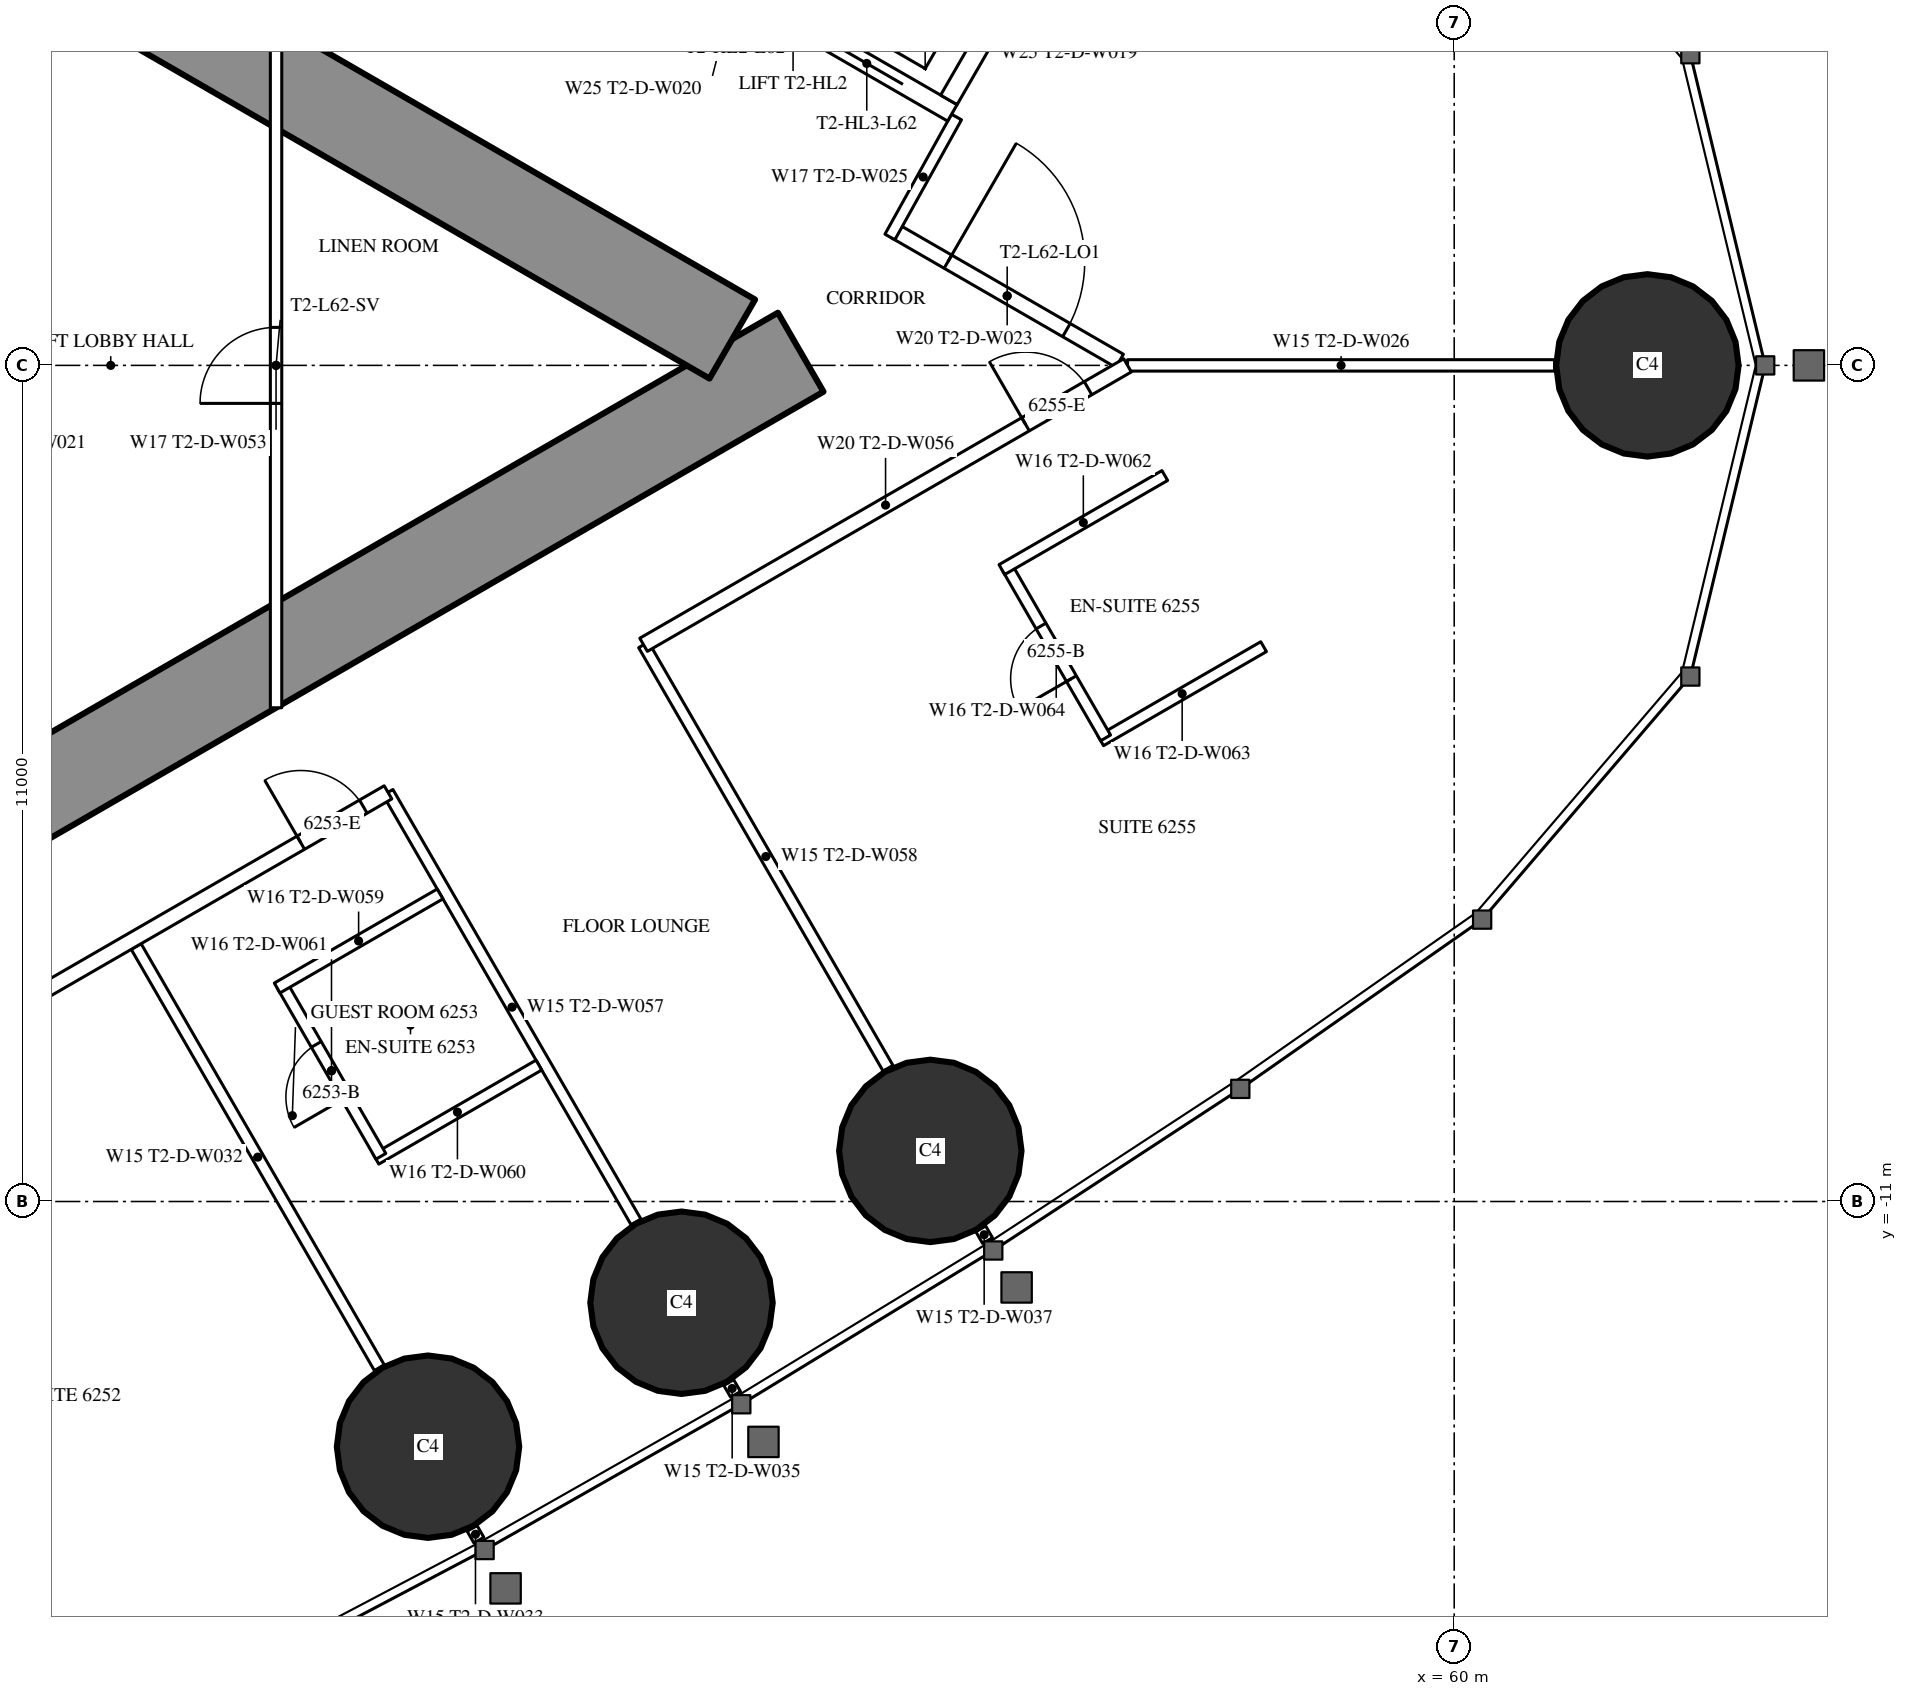
"""IFC4 building model, lengths in metres.
Left out: names, types, materials, properties, quantities, classifications, styles, units other than length and angle.
Written with IfcOpenShell. Run it as: python <this file> out.ifc"""

import sys

from ifc_helpers import new_model, si_unit, direction, frame, frame_2d, origin, origin_2d, place, context, subcontext, project, spatial, rectangle, circle, extrude, element, fill, save


model = new_model("IFC4")
c1 = context("Model", 3, precision=1e-05, world=origin(), true_north=direction((0.0, 1.0)))
c2 = subcontext(c1, "Body", "Model", "MODEL_VIEW")
j1 = project(units=[si_unit("LENGTHUNIT", "METRE"), si_unit("PLANEANGLEUNIT", "RADIAN")], contexts=[c1])
p1 = place(None, origin())
s1 = spatial("IfcSite", under=j1, at=p1, CompositionType="ELEMENT")
p2 = place(p1, origin())
s2 = spatial("IfcBuilding", under=s1, at=p2, CompositionType="ELEMENT")
p3 = place(p2, frame((0.0, 0.0, 233.3)))
s3 = spatial("IfcBuildingStorey", under=s2, at=p3, CompositionType="ELEMENT", Elevation=233.3)
for number, where, z_axis, x_axis in (
    (1, (62.542, 0.0, 0.0), (0.0, 0.0, 1.0), (1.0, 0.0, 0.0)),
    (2, (46.499, -14.226, 0.0), (0.0, 0.0, 1.0), (1.0, 0.0, 0.0)),
    (3, (49.834, -12.332, 0.0), (0.0, 0.0, 1.0), (1.0, 0.0, 0.0)),
    (4, (53.108, -10.334, 0.0), (0.0, 0.0, 1.0), (1.0, 0.0, 0.0)),
):
    element("IfcColumn", number, at=place(p3, frame(where, z_axis=z_axis, x_axis=x_axis)), inside=s3, PredefinedType="COLUMN", context=c2, shape_type="SweptSolid", body=[
        extrude(circle(Radius=1.2, at=origin_2d()), origin(), (0.0, 0.0, 1.0), 3.6),
    ])
p4 = place(p3, frame((27.2, -13.8, 0.0), z_axis=(0.0, 0.0, 1.0), x_axis=(0.866027159892, 0.499996958321, 0.0)))
e5 = element("IfcWall", 5, at=p4, inside=s3, PredefinedType="SHEAR", context=c2, shape_type="SweptSolid", body=[
    extrude(rectangle(XDim=27.947, YDim=1.2, at=frame_2d((13.973, 0.0))), origin(), (0.0, 0.0, 1.0), 3.6),
])
p5 = place(p4, frame((4.6, 0.0, 0.0)))
e6 = element("IfcOpeningElement", 6, at=p5, cuts=e5, PredefinedType="OPENING", context=c2, shape_type="SweptSolid", body=[
    extrude(rectangle(XDim=1.0, YDim=2.2, at=frame_2d((0.5, 1.1))), frame((0.0, 0.61, 0.0), z_axis=(0.0, -1.0, 0.0), x_axis=(1.0, 0.0, 0.0)), (0.0, 0.0, 1.0), 1.22),
])
p6 = place(p4, frame((13.395, 0.0, 0.0)))
e7 = element("IfcOpeningElement", 7, at=p6, cuts=e5, PredefinedType="OPENING", context=c2, shape_type="SweptSolid", body=[
    extrude(rectangle(XDim=1.8, YDim=2.2, at=frame_2d((0.9, 1.1))), frame((0.0, 0.61, 0.0), z_axis=(0.0, -1.0, 0.0), x_axis=(1.0, 0.0, 0.0)), (0.0, 0.0, 1.0), 1.22),
])
p7 = place(p3, frame((27.2, 13.8, 0.0), z_axis=(0.0, 0.0, 1.0), x_axis=(0.866024515034, -0.500001539357, 0.0)))
e8 = element("IfcWall", 8, at=p7, inside=s3, PredefinedType="SHEAR", context=c2, shape_type="SweptSolid", body=[
    extrude(rectangle(XDim=26.907, YDim=1.2, at=frame_2d((13.454, 0.0))), origin(), (0.0, 0.0, 1.0), 3.6),
])
p8 = place(p7, frame((4.6, 0.0, 0.0)))
e9 = element("IfcOpeningElement", 9, at=p8, cuts=e8, PredefinedType="OPENING", context=c2, shape_type="SweptSolid", body=[
    extrude(rectangle(XDim=1.0, YDim=2.2, at=frame_2d((0.5, 1.1))), frame((0.0, 0.61, 0.0), z_axis=(0.0, -1.0, 0.0), x_axis=(1.0, 0.0, 0.0)), (0.0, 0.0, 1.0), 1.22),
])
p9 = place(p7, frame((13.395, 0.0, 0.0)))
e10 = element("IfcOpeningElement", 10, at=p9, cuts=e8, PredefinedType="OPENING", context=c2, shape_type="SweptSolid", body=[
    extrude(rectangle(XDim=1.8, YDim=2.2, at=frame_2d((0.9, 1.1))), frame((0.0, 0.61, 0.0), z_axis=(0.0, -1.0, 0.0), x_axis=(1.0, 0.0, 0.0)), (0.0, 0.0, 1.0), 1.22),
])
p10 = place(p3, frame((42.66, -7.646, 0.0), z_axis=(0.0, 0.0, 1.0), x_axis=(0.499996592859, -0.866027370889, 0.0)))
e11 = element("IfcWall", 11, at=p10, inside=s3, PredefinedType="PARTITIONING", context=c2, shape_type="SweptSolid", body=[
    extrude(rectangle(XDim=6.398, YDim=0.15, at=frame_2d((3.199, 0.0))), origin(), (0.0, 0.0, 1.0), 2.45),
])
p11 = place(p3, frame((47.079, -15.3, 0.0), z_axis=(0.0, 0.0, 1.0), x_axis=(0.499212083968, -0.866479829667, 0.0)))
e12 = element("IfcWall", 12, at=p11, inside=s3, PredefinedType="PARTITIONING", context=c2, shape_type="SweptSolid", body=[
    extrude(rectangle(XDim=0.179, YDim=0.15, at=frame_2d((0.09, 0.0))), origin(), (0.0, 0.0, 1.0), 2.45),
])
p12 = place(p3, frame((45.973, -5.617, 0.0), z_axis=(0.0, 0.0, 1.0), x_axis=(0.499985856986, -0.866033569104, 0.0)))
e13 = element("IfcWall", 13, at=p12, inside=s3, PredefinedType="PARTITIONING", context=c2, shape_type="SweptSolid", body=[
    extrude(rectangle(XDim=6.526, YDim=0.15, at=frame_2d((3.263, 0.0))), origin(), (0.0, 0.0, 1.0), 2.45),
])
p13 = place(p3, frame((50.456, -13.382, 0.0), z_axis=(0.0, 0.0, 1.0), x_axis=(0.500661834965, -0.865642955848, 0.0)))
e14 = element("IfcWall", 14, at=p13, inside=s3, PredefinedType="PARTITIONING", context=c2, shape_type="SweptSolid", body=[
    extrude(rectangle(XDim=0.18, YDim=0.15, at=frame_2d((0.09, 0.0))), origin(), (0.0, 0.0, 1.0), 2.45),
])
p14 = place(p3, frame((49.335, -3.676, 0.0), z_axis=(0.0, 0.0, 1.0), x_axis=(0.500000613642, -0.866025049498, 0.0)))
e15 = element("IfcWall", 15, at=p14, inside=s3, PredefinedType="PARTITIONING", context=c2, shape_type="SweptSolid", body=[
    extrude(rectangle(XDim=6.433, YDim=0.15, at=frame_2d((3.216, 0.0))), origin(), (0.0, 0.0, 1.0), 2.45),
])
p15 = place(p3, frame((53.771, -11.36, 0.0), z_axis=(0.0, 0.0, 1.0), x_axis=(0.499524978789, -0.866299483762, 0.0)))
e16 = element("IfcWall", 16, at=p15, inside=s3, PredefinedType="PARTITIONING", context=c2, shape_type="SweptSolid", body=[
    extrude(rectangle(XDim=0.178, YDim=0.15, at=frame_2d((0.089, 0.0))), origin(), (0.0, 0.0, 1.0), 2.45),
])
p16 = place(p3, frame((55.702, 0.0, 0.0), z_axis=(0.0, 0.0, 1.0), x_axis=(1.0, 0.0, 0.0)))
e17 = element("IfcWall", 17, at=p16, inside=s3, PredefinedType="PARTITIONING", context=c2, shape_type="SweptSolid", body=[
    extrude(rectangle(XDim=5.619, YDim=0.15, at=frame_2d((2.81, 0.0))), origin(), (0.0, 0.0, 1.0), 2.45),
])
p17 = place(p3, frame((52.639, 1.769, 0.0), z_axis=(0.0, 0.0, 1.0), x_axis=(0.866027340901, -0.4999966448, 0.0)))
e18 = element("IfcWall", 18, at=p17, inside=s3, PredefinedType="PARTITIONING", context=c2, shape_type="SweptSolid", body=[
    extrude(rectangle(XDim=3.417, YDim=0.2, at=frame_2d((1.708, 0.0))), origin(), (0.0, 0.0, 1.0), 3.35),
])
p18 = place(p17, frame((0.809, 0.0, 0.0)))
e19 = element("IfcOpeningElement", 19, at=p18, cuts=e18, PredefinedType="OPENING", context=c2, shape_type="SweptSolid", body=[
    extrude(rectangle(XDim=1.8, YDim=2.2, at=frame_2d((0.9, 1.1))), frame((0.0, 0.11, 0.0), z_axis=(0.0, -1.0, 0.0), x_axis=(1.0, 0.0, 0.0)), (0.0, 0.0, 1.0), 0.22),
])
p19 = place(p3, frame((52.576, 1.689, 0.0), z_axis=(0.0, 0.0, 1.0), x_axis=(0.485424724123, 0.874278466629, 0.0)))
e20 = element("IfcWall", 20, at=p19, inside=s3, PredefinedType="PARTITIONING", context=c2, shape_type="SweptSolid", body=[
    extrude(rectangle(XDim=1.805, YDim=0.15, at=frame_2d((0.903, 0.0))), origin(), (0.0, 0.0, 1.0), 3.35),
])
p20 = place(p3, frame((45.814, -10.443, 0.0), z_axis=(0.0, 0.0, 1.0), x_axis=(0.866073894602, 0.499916002032, 0.0)))
e21 = element("IfcWall", 21, at=p20, inside=s3, PredefinedType="PARTITIONING", context=c2, shape_type="SweptSolid", body=[
    extrude(rectangle(XDim=2.475, YDim=0.15, at=frame_2d((1.238, 0.0))), origin(), (0.0, 0.0, 1.0), 3.35),
])
p21 = place(p3, frame((44.579, -8.154, 0.0), z_axis=(0.0, 0.0, 1.0), x_axis=(0.500006934395, -0.866021400173, 0.0)))
e22 = element("IfcWall", 22, at=p21, inside=s3, PredefinedType="PARTITIONING", context=c2, shape_type="SweptSolid", body=[
    extrude(rectangle(XDim=2.6, YDim=0.15, at=frame_2d((1.3, 0.0))), origin(), (0.0, 0.0, 1.0), 3.35),
])
p22 = place(p21, frame((0.9, 0.0, 0.0)))
e23 = element("IfcOpeningElement", 23, at=p22, cuts=e22, PredefinedType="OPENING", context=c2, shape_type="SweptSolid", body=[
    extrude(rectangle(XDim=0.8, YDim=2.2, at=frame_2d((0.4, 1.1))), frame((0.0, 0.085, 0.0), z_axis=(0.0, -1.0, 0.0), x_axis=(1.0, 0.0, 0.0)), (0.0, 0.0, 1.0), 0.17),
])
p23 = place(p3, frame((44.514, -8.191, 0.0), z_axis=(0.0, 0.0, 1.0), x_axis=(0.866031185235, 0.4999899861, 0.0)))
e24 = element("IfcWall", 24, at=p23, inside=s3, PredefinedType="PARTITIONING", context=c2, shape_type="SweptSolid", body=[
    extrude(rectangle(XDim=2.475, YDim=0.15, at=frame_2d((1.238, 0.0))), origin(), (0.0, 0.0, 1.0), 3.35),
])
p24 = place(p3, frame((55.349, -4.938, 0.0), z_axis=(0.0, 0.0, 1.0), x_axis=(0.866006523861, 0.500032699561, 0.0)))
e25 = element("IfcWall", 25, at=p24, inside=s3, PredefinedType="PARTITIONING", context=c2, shape_type="SweptSolid", body=[
    extrude(rectangle(XDim=2.475, YDim=0.15, at=frame_2d((1.237, 0.0))), origin(), (0.0, 0.0, 1.0), 3.35),
])
p25 = place(p3, frame((54.114, -2.649, 0.0), z_axis=(0.0, 0.0, 1.0), x_axis=(0.500006934395, -0.866021400173, 0.0)))
e26 = element("IfcWall", 26, at=p25, inside=s3, PredefinedType="PARTITIONING", context=c2, shape_type="SweptSolid", body=[
    extrude(rectangle(XDim=2.6, YDim=0.15, at=frame_2d((1.3, 0.0))), origin(), (0.0, 0.0, 1.0), 3.35),
])
p26 = place(p25, frame((0.9, 0.0, 0.0)))
e27 = element("IfcOpeningElement", 27, at=p26, cuts=e26, PredefinedType="OPENING", context=c2, shape_type="SweptSolid", body=[
    extrude(rectangle(XDim=0.8, YDim=2.2, at=frame_2d((0.4, 1.1))), frame((0.0, 0.085, 0.0), z_axis=(0.0, -1.0, 0.0), x_axis=(1.0, 0.0, 0.0)), (0.0, 0.0, 1.0), 0.17),
])
p27 = place(p3, frame((54.049, -2.687, 0.0), z_axis=(0.0, 0.0, 1.0), x_axis=(0.866006523861, 0.500032699561, 0.0)))
e28 = element("IfcWall", 28, at=p27, inside=s3, PredefinedType="PARTITIONING", context=c2, shape_type="SweptSolid", body=[
    extrude(rectangle(XDim=2.475, YDim=0.15, at=frame_2d((1.237, 0.0))), origin(), (0.0, 0.0, 1.0), 3.35),
])
p28 = place(p3, frame((28.959, -15.44, 0.0), z_axis=(0.0, 0.0, 1.0), x_axis=(0.866025204199, 0.500000345692, 0.0)))
e29 = element("IfcWall", 29, at=p28, inside=s3, PredefinedType="PARTITIONING", context=c2, shape_type="SweptSolid", body=[
    extrude(rectangle(XDim=19.646, YDim=0.2, at=frame_2d((9.823, 0.0))), origin(), (0.0, 0.0, 1.0), 3.35),
])
p29 = place(p28, frame((1.494, 0.0, 0.0)))
e30 = element("IfcOpeningElement", 30, at=p29, cuts=e29, PredefinedType="OPENING", context=c2, shape_type="SweptSolid", body=[
    extrude(rectangle(XDim=1.8, YDim=2.03, at=frame_2d((0.9, 1.015))), frame((0.0, 0.11, 0.0), z_axis=(0.0, -1.0, 0.0), x_axis=(1.0, 0.0, 0.0)), (0.0, 0.0, 1.0), 0.22),
])
p30 = place(p28, frame((7.687, 0.0, 0.0)))
e31 = element("IfcOpeningElement", 31, at=p30, cuts=e29, PredefinedType="OPENING", context=c2, shape_type="SweptSolid", body=[
    extrude(rectangle(XDim=1.0, YDim=2.2, at=frame_2d((0.5, 1.1))), frame((0.0, 0.11, 0.0), z_axis=(0.0, -1.0, 0.0), x_axis=(1.0, 0.0, 0.0)), (0.0, 0.0, 1.0), 0.22),
])
p31 = place(p28, frame((18.321, 0.0, 0.0)))
e32 = element("IfcOpeningElement", 32, at=p31, cuts=e29, PredefinedType="OPENING", context=c2, shape_type="SweptSolid", body=[
    extrude(rectangle(XDim=0.95, YDim=2.2, at=frame_2d((0.475, 1.1))), frame((0.0, 0.11, 0.0), z_axis=(0.0, -1.0, 0.0), x_axis=(1.0, 0.0, 0.0)), (0.0, 0.0, 1.0), 0.22),
])
p32 = place(p3, frame((49.335, -3.676, 0.0), z_axis=(0.0, 0.0, 1.0), x_axis=(0.866021344046, 0.500007031608, 0.0)))
e33 = element("IfcWall", 33, at=p32, inside=s3, PredefinedType="PARTITIONING", context=c2, shape_type="SweptSolid", body=[
    extrude(rectangle(XDim=7.352, YDim=0.2, at=frame_2d((3.676, 0.0))), origin(), (0.0, 0.0, 1.0), 3.35),
])
p33 = place(p32, frame((5.802, 0.0, 0.0)))
e34 = element("IfcOpeningElement", 34, at=p33, cuts=e33, PredefinedType="OPENING", context=c2, shape_type="SweptSolid", body=[
    extrude(rectangle(XDim=0.95, YDim=2.2, at=frame_2d((0.475, 1.1))), frame((0.0, 0.11, 0.0), z_axis=(0.0, -1.0, 0.0), x_axis=(1.0, 0.0, 0.0)), (0.0, 0.0, 1.0), 0.22),
])
p34 = place(p3, frame((44.5, -4.505, 0.0), z_axis=(0.0, 0.0, 1.0), x_axis=(0.0, 1.0, 0.0)))
e35 = element("IfcWall", 35, at=p34, inside=s3, PredefinedType="PARTITIONING", context=c2, shape_type="SweptSolid", body=[
    extrude(rectangle(XDim=9.009, YDim=0.15, at=frame_2d((4.505, 0.0))), origin(), (0.0, 0.0, 1.0), 3.35),
])
p35 = place(p34, frame((4.005, 0.0, 0.0)))
e36 = element("IfcOpeningElement", 36, at=p35, cuts=e35, PredefinedType="OPENING", context=c2, shape_type="SweptSolid", body=[
    extrude(rectangle(XDim=1.0, YDim=2.2, at=frame_2d((0.5, 1.1))), frame((0.0, 0.085, 0.0), z_axis=(0.0, -1.0, 0.0), x_axis=(1.0, 0.0, 0.0)), (0.0, 0.0, 1.0), 0.17),
])
p36 = place(p3, frame((47.681, 6.622, 0.0), z_axis=(0.0, 0.0, 1.0), x_axis=(0.86603344179, -0.499986077507, 0.0)))
e37 = element("IfcWall", 37, at=p36, inside=s3, PredefinedType="PARTITIONING", context=c2, shape_type="SweptSolid", body=[
    extrude(rectangle(XDim=6.6, YDim=0.25, at=frame_2d((3.3, 0.0))), origin(), (0.0, 0.0, 1.0), 3.35),
])
p37 = place(p36, frame((0.75, 0.0, 0.0)))
e38 = element("IfcOpeningElement", 38, at=p37, cuts=e37, PredefinedType="OPENING", context=c2, shape_type="SweptSolid", body=[
    extrude(rectangle(XDim=1.1, YDim=2.2, at=frame_2d((0.55, 1.1))), frame((0.0, 0.135, 0.0), z_axis=(0.0, -1.0, 0.0), x_axis=(1.0, 0.0, 0.0)), (0.0, 0.0, 1.0), 0.27),
])
p38 = place(p36, frame((2.75, 0.0, 0.0)))
e39 = element("IfcOpeningElement", 39, at=p38, cuts=e37, PredefinedType="OPENING", context=c2, shape_type="SweptSolid", body=[
    extrude(rectangle(XDim=1.1, YDim=2.2, at=frame_2d((0.55, 1.1))), frame((0.0, 0.135, 0.0), z_axis=(0.0, -1.0, 0.0), x_axis=(1.0, 0.0, 0.0)), (0.0, 0.0, 1.0), 0.27),
])
p39 = place(p36, frame((4.75, 0.0, 0.0)))
e40 = element("IfcOpeningElement", 40, at=p39, cuts=e37, PredefinedType="OPENING", context=c2, shape_type="SweptSolid", body=[
    extrude(rectangle(XDim=1.1, YDim=2.2, at=frame_2d((0.55, 1.1))), frame((0.0, 0.135, 0.0), z_axis=(0.0, -1.0, 0.0), x_axis=(1.0, 0.0, 0.0)), (0.0, 0.0, 1.0), 0.27),
])
p40 = place(p3, frame((53.352, 3.493, 0.0), z_axis=(0.0, 0.0, 1.0), x_axis=(0.499872130319, 0.866099216793, 0.0)))
e41 = element("IfcWall", 41, at=p40, inside=s3, PredefinedType="PARTITIONING", context=c2, shape_type="SweptSolid", body=[
    extrude(rectangle(XDim=3.2, YDim=0.25, at=frame_2d((1.6, 0.0))), origin(), (0.0, 0.0, 1.0), 3.35),
])
p41 = place(p22, origin())
e42 = element("IfcDoor", 42, at=p41, inside=s3, OperationType="SINGLE_SWING_RIGHT", PredefinedType="DOOR", context=c2, shape_type="SweptSolid", body=[
    extrude(rectangle(XDim=0.8, YDim=2.2, at=frame_2d((0.4, 1.1))), frame((0.0, 0.025, 0.0), z_axis=(0.0, -1.0, 0.0), x_axis=(1.0, 0.0, 0.0)), (0.0, 0.0, 1.0), 0.05),
])
fill(e23, e42)
p42 = place(p31, origin())
e43 = element("IfcDoor", 43, at=p42, inside=s3, OperationType="SINGLE_SWING_LEFT", PredefinedType="DOOR", context=c2, shape_type="SweptSolid", body=[
    extrude(rectangle(XDim=0.95, YDim=2.2, at=frame_2d((0.475, 1.1))), frame((0.0, 0.025, 0.0), z_axis=(0.0, -1.0, 0.0), x_axis=(1.0, 0.0, 0.0)), (0.0, 0.0, 1.0), 0.05),
])
fill(e32, e43)
p43 = place(p26, origin())
e44 = element("IfcDoor", 44, at=p43, inside=s3, OperationType="SINGLE_SWING_RIGHT", PredefinedType="DOOR", context=c2, shape_type="SweptSolid", body=[
    extrude(rectangle(XDim=0.8, YDim=2.2, at=frame_2d((0.4, 1.1))), frame((0.0, 0.025, 0.0), z_axis=(0.0, -1.0, 0.0), x_axis=(1.0, 0.0, 0.0)), (0.0, 0.0, 1.0), 0.05),
])
fill(e27, e44)
p44 = place(p33, origin())
e45 = element("IfcDoor", 45, at=p44, inside=s3, OperationType="SINGLE_SWING_LEFT", PredefinedType="DOOR", context=c2, shape_type="SweptSolid", body=[
    extrude(rectangle(XDim=0.95, YDim=2.2, at=frame_2d((0.475, 1.1))), frame((0.0, 0.025, 0.0), z_axis=(0.0, -1.0, 0.0), x_axis=(1.0, 0.0, 0.0)), (0.0, 0.0, 1.0), 0.05),
])
fill(e34, e45)
p45 = place(p18, origin())
e46 = element("IfcDoor", 46, at=p45, inside=s3, OperationType="DOUBLE_DOOR_SINGLE_SWING", PredefinedType="DOOR", context=c2, shape_type="SweptSolid", body=[
    extrude(rectangle(XDim=1.8, YDim=2.2, at=frame_2d((0.9, 1.1))), frame((0.0, 0.025, 0.0), z_axis=(0.0, -1.0, 0.0), x_axis=(1.0, 0.0, 0.0)), (0.0, 0.0, 1.0), 0.05),
])
fill(e19, e46)
p46 = place(p35, origin())
e47 = element("IfcDoor", 47, at=p46, inside=s3, OperationType="SINGLE_SWING_LEFT", PredefinedType="DOOR", context=c2, shape_type="SweptSolid", body=[
    extrude(rectangle(XDim=1.0, YDim=2.2, at=frame_2d((0.5, 1.1))), frame((0.0, 0.025, 0.0), z_axis=(0.0, -1.0, 0.0), x_axis=(1.0, 0.0, 0.0)), (0.0, 0.0, 1.0), 0.05),
])
fill(e36, e47)
p47 = place(p39, origin())
e48 = element("IfcDoor", 48, at=p47, inside=s3, OperationType="DOUBLE_DOOR_SLIDING", PredefinedType="USERDEFINED", context=c2, shape_type="SweptSolid", body=[
    extrude(rectangle(XDim=1.1, YDim=2.2, at=frame_2d((0.55, 1.1))), frame((0.0, 0.025, 0.0), z_axis=(0.0, -1.0, 0.0), x_axis=(1.0, 0.0, 0.0)), (0.0, 0.0, 1.0), 0.05),
])
fill(e40, e48)
save(model, sys.argv[1])
